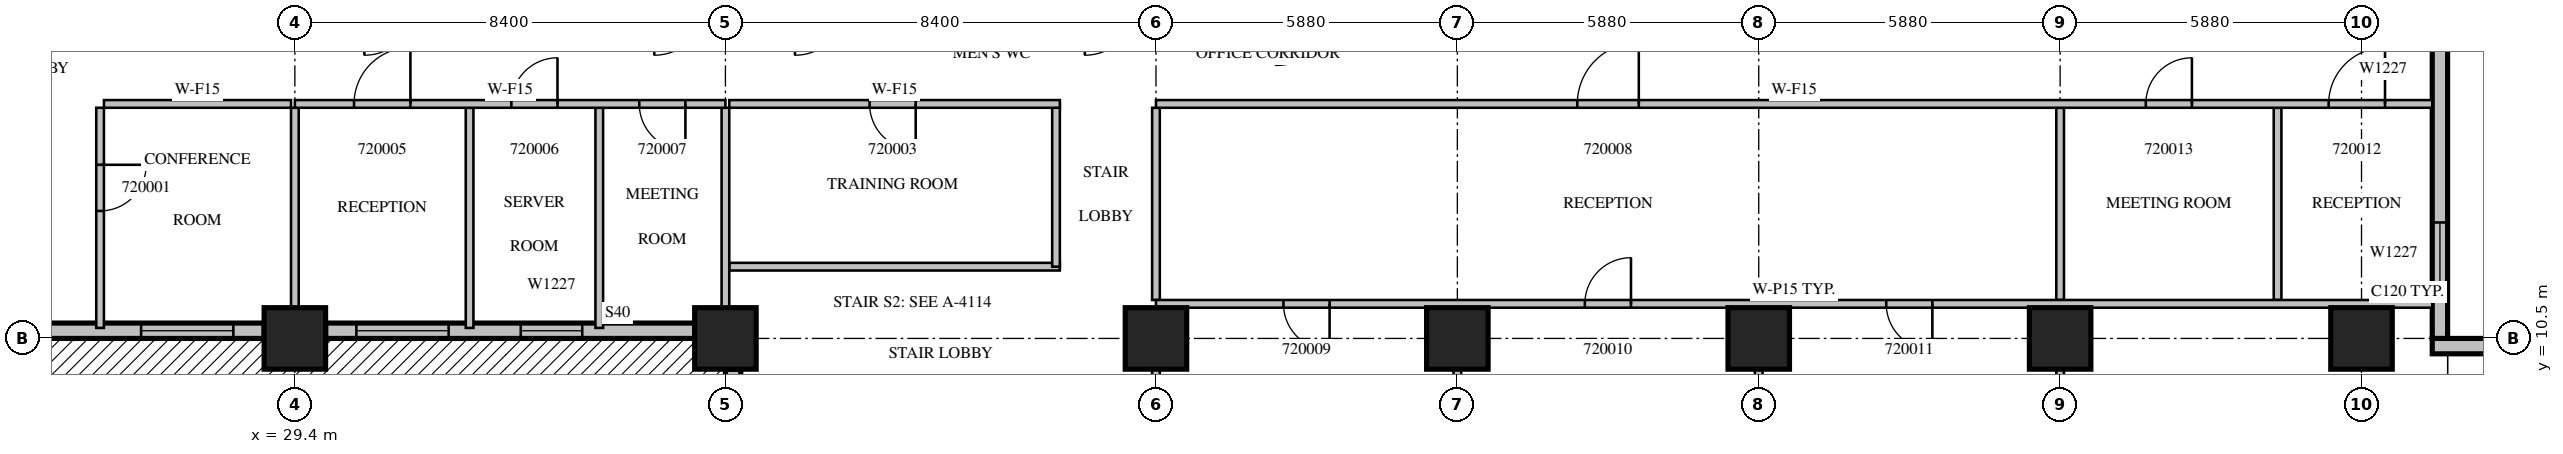
"""IFC4 building model, lengths in metres.
Left out: names, types, materials, properties, quantities, classifications, styles, units other than length and angle.
Written with IfcOpenShell. Run it as: python <this file> out.ifc"""

import sys

from ifc_helpers import new_model, si_unit, direction, frame, frame_2d, origin, origin_2d, place, context, subcontext, project, spatial, rectangle, extrude, source, transform, mapped, element, fill, save


model = new_model("IFC4")
c1 = context("Model", 3, precision=1e-05, world=origin(), true_north=direction((0.0, 1.0)))
c2 = subcontext(c1, "Body", "Model", "MODEL_VIEW")
j1 = project(units=[si_unit("LENGTHUNIT", "METRE"), si_unit("PLANEANGLEUNIT", "RADIAN")], contexts=[c1])
p1 = place(None, origin())
s1 = spatial("IfcSite", under=j1, at=p1, CompositionType="ELEMENT")
p2 = place(p1, origin())
s2 = spatial("IfcBuilding", under=s1, at=p2, CompositionType="ELEMENT")
p3 = place(p2, frame((0.0, 0.0, 95.1)))
s3 = spatial("IfcBuildingStorey", under=s2, at=p3, CompositionType="ELEMENT", Elevation=95.1)
m1 = source(origin(), c2, "Body", "SweptSolid", [
    extrude(rectangle(XDim=1.2, YDim=1.2, at=origin_2d()), origin(), (0.0, 0.0, 1.0), 4.2),
])
for number, where, z_axis, x_axis in (
    (1, (29.4, 10.5, 0.0), (0.0, 0.0, 1.0), (1.0, 0.0, 0.0)),
    (2, (37.8, 10.5, 0.0), (0.0, 0.0, 1.0), (1.0, 0.0, 0.0)),
    (3, (46.2, 10.5, 0.0), (0.0, 0.0, 1.0), (1.0, 0.0, 0.0)),
    (4, (52.08, 10.5, 0.0), (0.0, 0.0, 1.0), (1.0, 0.0, 0.0)),
    (5, (57.96, 10.5, 0.0), (0.0, 0.0, 1.0), (1.0, 0.0, 0.0)),
    (6, (63.84, 10.5, 0.0), (0.0, 0.0, 1.0), (1.0, 0.0, 0.0)),
    (7, (69.72, 10.5, 0.0), (0.0, 0.0, 1.0), (1.0, 0.0, 0.0)),
):
    element("IfcColumn", number, at=place(p3, frame(where, z_axis=z_axis, x_axis=x_axis)), inside=s3, PredefinedType="COLUMN", context=c2, shape_type="MappedRepresentation", body=[
        mapped(m1, transform((0.0, 0.0, 0.0), scale=1.0)),
    ])
m2 = source(origin(), c2, "Body", "SweptSolid", [
    extrude(rectangle(XDim=6.6, YDim=0.3, at=frame_2d((3.3, 0.0))), origin(), (0.0, 0.0, 1.0), 3.8),
])
p4 = place(p3, frame((22.2, 10.65, 0.0), z_axis=(0.0, 0.0, 1.0), x_axis=(1.0, 0.0, 0.0)))
e8 = element("IfcWall", 8, at=p4, inside=s3, PredefinedType="STANDARD", context=c2, shape_type="MappedRepresentation", body=[
    mapped(m2, transform((0.0, 0.0, 0.0), scale=1.0)),
])
m3 = source(origin(), c2, "Body", "SweptSolid", [
    extrude(rectangle(XDim=1.8, YDim=2.4, at=frame_2d((0.9, 1.2))), frame((0.0, 0.16, 0.0), z_axis=(0.0, -1.0, 0.0), x_axis=(1.0, 0.0, 0.0)), (0.0, 0.0, 1.0), 0.32),
])
p5 = place(p4, frame((0.1, 0.0, 0.0)))
e9 = element("IfcOpeningElement", 9, at=p5, cuts=e8, PredefinedType="OPENING", context=c2, shape_type="MappedRepresentation", body=[
    mapped(m3, transform((0.0, 0.0, 0.0), scale=1.0)),
])
p6 = place(p4, frame((4.2, 0.0, 0.0)))
e10 = element("IfcOpeningElement", 10, at=p6, cuts=e8, PredefinedType="OPENING", context=c2, shape_type="MappedRepresentation", body=[
    mapped(m3, transform((0.0, 0.0, 0.0), scale=1.0)),
])
m4 = source(origin(), c2, "Body", "SweptSolid", [
    extrude(rectangle(XDim=7.2, YDim=0.3, at=frame_2d((3.6, 0.0))), origin(), (0.0, 0.0, 1.0), 3.8),
])
p7 = place(p3, frame((30.0, 10.65, 0.0), z_axis=(0.0, 0.0, 1.0), x_axis=(1.0, 0.0, 0.0)))
e11 = element("IfcWall", 11, at=p7, inside=s3, PredefinedType="STANDARD", context=c2, shape_type="MappedRepresentation", body=[
    mapped(m4, transform((0.0, 0.0, 0.0), scale=1.0)),
])
p8 = place(p7, frame((0.6, 0.0, 0.0)))
e12 = element("IfcOpeningElement", 12, at=p8, cuts=e11, PredefinedType="OPENING", context=c2, shape_type="MappedRepresentation", body=[
    mapped(m3, transform((0.0, 0.0, 0.0), scale=1.0)),
])
m5 = source(origin(), c2, "Body", "SweptSolid", [
    extrude(rectangle(XDim=1.2, YDim=2.7, at=frame_2d((0.6, 1.35))), frame((0.0, 0.16, 0.0), z_axis=(0.0, -1.0, 0.0), x_axis=(1.0, 0.0, 0.0)), (0.0, 0.0, 1.0), 0.32),
])
p9 = place(p7, frame((3.807, 0.0, 0.6)))
e13 = element("IfcOpeningElement", 13, at=p9, cuts=e11, PredefinedType="OPENING", context=c2, shape_type="MappedRepresentation", body=[
    mapped(m5, transform((0.0, 0.0, 0.0), scale=1.0)),
])
m6 = source(origin(), c2, "Body", "SweptSolid", [
    extrude(rectangle(XDim=8.7, YDim=0.3, at=frame_2d((4.35, 0.0))), origin(), (0.0, 0.0, 1.0), 3.8),
])
p10 = place(p3, frame((37.95, 9.9, 0.0), z_axis=(0.0, 0.0, 1.0), x_axis=(0.0, -1.0, 0.0)))
e14 = element("IfcWall", 14, at=p10, inside=s3, PredefinedType="STANDARD", context=c2, shape_type="MappedRepresentation", body=[
    mapped(m6, transform((0.0, 0.0, 0.0), scale=1.0)),
])
m7 = source(origin(), c2, "Body", "SweptSolid", [
    extrude(rectangle(XDim=1.8, YDim=2.7, at=frame_2d((0.9, 1.35))), frame((0.0, 0.16, 0.0), z_axis=(0.0, -1.0, 0.0), x_axis=(1.0, 0.0, 0.0)), (0.0, 0.0, 1.0), 0.32),
])
p11 = place(p10, frame((1.812, 0.0, 0.6)))
e15 = element("IfcOpeningElement", 15, at=p11, cuts=e14, PredefinedType="OPENING", context=c2, shape_type="MappedRepresentation", body=[
    mapped(m7, transform((0.0, 0.0, 0.0), scale=1.0)),
])
m8 = source(origin(), c2, "Body", "SweptSolid", [
    extrude(rectangle(XDim=2.4, YDim=2.7, at=frame_2d((1.2, 1.35))), frame((0.0, 0.16, 0.0), z_axis=(0.0, -1.0, 0.0), x_axis=(1.0, 0.0, 0.0)), (0.0, 0.0, 1.0), 0.32),
])
p12 = place(p10, frame((6.075, 0.0, 0.6)))
e16 = element("IfcOpeningElement", 16, at=p12, cuts=e14, PredefinedType="OPENING", context=c2, shape_type="MappedRepresentation", body=[
    mapped(m8, transform((0.0, 0.0, 0.0), scale=1.0)),
])
m9 = source(origin(), c2, "Body", "SweptSolid", [
    extrude(rectangle(XDim=1.2, YDim=0.3, at=frame_2d((0.6, 0.0))), origin(), (0.0, 0.0, 1.0), 3.8),
])
p13 = place(p3, frame((71.1, 10.35, 0.0), z_axis=(0.0, 0.0, 1.0), x_axis=(1.0, 0.0, 0.0)))
e17 = element("IfcWall", 17, at=p13, inside=s3, PredefinedType="STANDARD", context=c2, shape_type="MappedRepresentation", body=[
    mapped(m9, transform((0.0, 0.0, 0.0), scale=1.0)),
])
m10 = source(origin(), c2, "Body", "SweptSolid", [
    extrude(rectangle(XDim=6.3, YDim=0.3, at=frame_2d((3.15, 0.0))), origin(), (0.0, 0.0, 1.0), 3.8),
])
p14 = place(p3, frame((71.25, 10.5, 0.0), z_axis=(0.0, 0.0, 1.0), x_axis=(0.0, 1.0, 0.0)))
e18 = element("IfcWall", 18, at=p14, inside=s3, PredefinedType="STANDARD", context=c2, shape_type="MappedRepresentation", body=[
    mapped(m10, transform((0.0, 0.0, 0.0), scale=1.0)),
])
p15 = place(p14, frame((1.062, 0.0, 0.6)))
e19 = element("IfcOpeningElement", 19, at=p15, cuts=e18, PredefinedType="OPENING", context=c2, shape_type="MappedRepresentation", body=[
    mapped(m5, transform((0.0, 0.0, 0.0), scale=1.0)),
])
m11 = source(origin(), c2, "Body", "SweptSolid", [
    extrude(rectangle(XDim=4.295, YDim=0.15, at=frame_2d((2.147, 0.0))), origin(), (0.0, 0.0, 1.0), 3.8),
])
p16 = place(p3, frame((25.6, 15.0, 0.0), z_axis=(0.0, 0.0, 1.0), x_axis=(0.0, -1.0, 0.0)))
e20 = element("IfcWall", 20, at=p16, inside=s3, PredefinedType="PARTITIONING", context=c2, shape_type="MappedRepresentation", body=[
    mapped(m11, transform((0.0, 0.0, 0.0), scale=1.0)),
])
m12 = source(origin(), c2, "Body", "SweptSolid", [
    extrude(rectangle(XDim=0.9, YDim=2.1, at=frame_2d((0.45, 1.05))), frame((0.0, 0.085, 0.0), z_axis=(0.0, -1.0, 0.0), x_axis=(1.0, 0.0, 0.0)), (0.0, 0.0, 1.0), 0.17),
])
p17 = place(p16, frame((1.113, 0.0, 0.0)))
e21 = element("IfcOpeningElement", 21, at=p17, cuts=e20, PredefinedType="OPENING", context=c2, shape_type="MappedRepresentation", body=[
    mapped(m12, transform((0.0, 0.0, 0.0), scale=1.0)),
])
m13 = source(origin(), c2, "Body", "SweptSolid", [
    extrude(rectangle(XDim=3.65, YDim=0.15, at=frame_2d((1.825, 0.0))), origin(), (0.0, 0.0, 1.0), 3.8),
])
p18 = place(p3, frame((29.325, 15.075, 0.0), z_axis=(0.0, 0.0, 1.0), x_axis=(-1.0, 0.0, 0.0)))
e22 = element("IfcWall", 22, at=p18, inside=s3, PredefinedType="PARTITIONING", context=c2, shape_type="MappedRepresentation", body=[
    mapped(m13, transform((0.0, 0.0, 0.0), scale=1.0)),
])
m14 = source(origin(), c2, "Body", "SweptSolid", [
    extrude(rectangle(XDim=3.901, YDim=0.15, at=frame_2d((1.95, 0.0))), origin(), (0.0, 0.0, 1.0), 3.8),
])
p19 = place(p3, frame((29.4, 11.099, 0.0), z_axis=(0.0, 0.0, 1.0), x_axis=(0.0, 1.0, 0.0)))
e23 = element("IfcWall", 23, at=p19, inside=s3, PredefinedType="PARTITIONING", context=c2, shape_type="MappedRepresentation", body=[
    mapped(m14, transform((0.0, 0.0, 0.0), scale=1.0)),
])
m15 = source(origin(), c2, "Body", "SweptSolid", [
    extrude(rectangle(XDim=6.45, YDim=0.15, at=frame_2d((3.225, 0.0))), origin(), (0.0, 0.0, 1.0), 3.8),
])
p20 = place(p3, frame((37.875, 11.9, 0.0), z_axis=(0.0, 0.0, 1.0), x_axis=(1.0, 0.0, 0.0)))
e24 = element("IfcWall", 24, at=p20, inside=s3, PredefinedType="PARTITIONING", context=c2, shape_type="MappedRepresentation", body=[
    mapped(m15, transform((0.0, 0.0, 0.0), scale=1.0)),
])
m16 = source(origin(), c2, "Body", "SweptSolid", [
    extrude(rectangle(XDim=3.175, YDim=0.15, at=frame_2d((1.587, 0.0))), origin(), (0.0, 0.0, 1.0), 3.8),
])
p21 = place(p3, frame((44.25, 11.9, 0.0), z_axis=(0.0, 0.0, 1.0), x_axis=(0.0, 1.0, 0.0)))
e25 = element("IfcWall", 25, at=p21, inside=s3, PredefinedType="PARTITIONING", context=c2, shape_type="MappedRepresentation", body=[
    mapped(m16, transform((0.0, 0.0, 0.0), scale=1.0)),
])
p22 = place(p3, frame((44.325, 15.075, 0.0), z_axis=(0.0, 0.0, 1.0), x_axis=(-1.0, 0.0, 0.0)))
e26 = element("IfcWall", 26, at=p22, inside=s3, PredefinedType="PARTITIONING", context=c2, shape_type="MappedRepresentation", body=[
    mapped(m15, transform((0.0, 0.0, 0.0), scale=1.0)),
])
p23 = place(p22, frame((2.812, 0.0, 0.0)))
e27 = element("IfcOpeningElement", 27, at=p23, cuts=e26, PredefinedType="OPENING", context=c2, shape_type="MappedRepresentation", body=[
    mapped(m12, transform((0.0, 0.0, 0.0), scale=1.0)),
])
for number, where, z_axis, x_axis in (
    (28, (32.809, 10.705, 0.0), (0.0, 0.0, 1.0), (0.0, 1.0, 0.0)),
    (29, (35.339, 10.705, 0.0), (0.0, 0.0, 1.0), (0.0, 1.0, 0.0)),
):
    element("IfcWall", number, at=place(p3, frame(where, z_axis=z_axis, x_axis=x_axis)), inside=s3, PredefinedType="PARTITIONING", context=c2, shape_type="MappedRepresentation", body=[
        mapped(m11, transform((0.0, 0.0, 0.0), scale=1.0)),
    ])
p24 = place(p3, frame((37.8, 11.099, 0.0), z_axis=(0.0, 0.0, 1.0), x_axis=(0.0, 1.0, 0.0)))
e30 = element("IfcWall", 30, at=p24, inside=s3, PredefinedType="PARTITIONING", context=c2, shape_type="MappedRepresentation", body=[
    mapped(m14, transform((0.0, 0.0, 0.0), scale=1.0)),
])
m17 = source(origin(), c2, "Body", "SweptSolid", [
    extrude(rectangle(XDim=8.702, YDim=0.15, at=frame_2d((4.351, 0.0))), origin(), (0.0, 0.0, 1.0), 3.8),
])
for number, where, z_axis, x_axis in (
    (31, (52.08, 1.199, 0.0), (0.0, 0.0, 1.0), (0.0, 1.0, 0.0)),
    (32, (57.96, 1.199, 0.0), (0.0, 0.0, 1.0), (0.0, 1.0, 0.0)),
):
    element("IfcWall", number, at=place(p3, frame(where, z_axis=z_axis, x_axis=x_axis)), inside=s3, PredefinedType="PARTITIONING", context=c2, shape_type="MappedRepresentation", body=[
        mapped(m17, transform((0.0, 0.0, 0.0), scale=1.0)),
    ])
m18 = source(origin(), c2, "Body", "SweptSolid", [
    extrude(rectangle(XDim=3.75, YDim=0.15, at=frame_2d((1.875, 0.0))), origin(), (0.0, 0.0, 1.0), 3.8),
])
p25 = place(p3, frame((68.082, 11.25, 0.0), z_axis=(0.0, 0.0, 1.0), x_axis=(0.0, 1.0, 0.0)))
e33 = element("IfcWall", 33, at=p25, inside=s3, PredefinedType="PARTITIONING", context=c2, shape_type="MappedRepresentation", body=[
    mapped(m18, transform((0.0, 0.0, 0.0), scale=1.0)),
])
p26 = place(p3, frame((46.2, 1.199, 0.0), z_axis=(0.0, 0.0, 1.0), x_axis=(0.0, 1.0, 0.0)))
e34 = element("IfcWall", 34, at=p26, inside=s3, PredefinedType="PARTITIONING", context=c2, shape_type="MappedRepresentation", body=[
    mapped(m17, transform((0.0, 0.0, 0.0), scale=1.0)),
])
p27 = place(p3, frame((46.2, 11.25, 0.0), z_axis=(0.0, 0.0, 1.0), x_axis=(0.0, 1.0, 0.0)))
e35 = element("IfcWall", 35, at=p27, inside=s3, PredefinedType="PARTITIONING", context=c2, shape_type="MappedRepresentation", body=[
    mapped(m18, transform((0.0, 0.0, 0.0), scale=1.0)),
])
p28 = place(p3, frame((63.84, 1.199, 0.0), z_axis=(0.0, 0.0, 1.0), x_axis=(0.0, 1.0, 0.0)))
e36 = element("IfcWall", 36, at=p28, inside=s3, PredefinedType="PARTITIONING", context=c2, shape_type="MappedRepresentation", body=[
    mapped(m17, transform((0.0, 0.0, 0.0), scale=1.0)),
])
p29 = place(p28, frame((3.901, 0.0, 0.0)))
e37 = element("IfcOpeningElement", 37, at=p29, cuts=e36, PredefinedType="OPENING", context=c2, shape_type="MappedRepresentation", body=[
    mapped(m12, transform((0.0, 0.0, 0.0), scale=1.0)),
])
p30 = place(p3, frame((63.84, 11.25, 0.0), z_axis=(0.0, 0.0, 1.0), x_axis=(0.0, 1.0, 0.0)))
e38 = element("IfcWall", 38, at=p30, inside=s3, PredefinedType="PARTITIONING", context=c2, shape_type="MappedRepresentation", body=[
    mapped(m18, transform((0.0, 0.0, 0.0), scale=1.0)),
])
m19 = source(origin(), c2, "Body", "SweptSolid", [
    extrude(rectangle(XDim=24.9, YDim=0.15, at=frame_2d((12.45, 0.0))), origin(), (0.0, 0.0, 1.0), 3.8),
])
p31 = place(p3, frame((71.1, 11.175, 0.0), z_axis=(0.0, 0.0, 1.0), x_axis=(-1.0, 0.0, 0.0)))
e39 = element("IfcWall", 39, at=p31, inside=s3, PredefinedType="PARTITIONING", context=c2, shape_type="MappedRepresentation", body=[
    mapped(m19, transform((0.0, 0.0, 0.0), scale=1.0)),
])
p32 = place(p31, frame((21.512, 0.0, 0.0)))
e40 = element("IfcOpeningElement", 40, at=p32, cuts=e39, PredefinedType="OPENING", context=c2, shape_type="MappedRepresentation", body=[
    mapped(m12, transform((0.0, 0.0, 0.0), scale=1.0)),
])
p33 = place(p31, frame((15.633, 0.0, 0.0)))
e41 = element("IfcOpeningElement", 41, at=p33, cuts=e39, PredefinedType="OPENING", context=c2, shape_type="MappedRepresentation", body=[
    mapped(m12, transform((0.0, 0.0, 0.0), scale=1.0)),
])
p34 = place(p31, frame((9.752, 0.0, 0.0)))
e42 = element("IfcOpeningElement", 42, at=p34, cuts=e39, PredefinedType="OPENING", context=c2, shape_type="MappedRepresentation", body=[
    mapped(m12, transform((0.0, 0.0, 0.0), scale=1.0)),
])
m20 = source(origin(), c2, "Body", "SweptSolid", [
    extrude(rectangle(XDim=8.4, YDim=0.15, at=frame_2d((4.2, 0.0))), origin(), (0.0, 0.0, 1.0), 3.8),
])
p35 = place(p3, frame((37.8, 15.075, 0.0), z_axis=(0.0, 0.0, 1.0), x_axis=(-1.0, 0.0, 0.0)))
e43 = element("IfcWall", 43, at=p35, inside=s3, PredefinedType="PARTITIONING", context=c2, shape_type="MappedRepresentation", body=[
    mapped(m20, transform((0.0, 0.0, 0.0), scale=1.0)),
])
m21 = source(origin(), c2, "Body", "SweptSolid", [
    extrude(rectangle(XDim=1.1, YDim=2.1, at=frame_2d((0.55, 1.05))), frame((0.0, 0.085, 0.0), z_axis=(0.0, -1.0, 0.0), x_axis=(1.0, 0.0, 0.0)), (0.0, 0.0, 1.0), 0.17),
])
p36 = place(p35, frame((6.146, 0.0, 0.0)))
e44 = element("IfcOpeningElement", 44, at=p36, cuts=e43, PredefinedType="OPENING", context=c2, shape_type="MappedRepresentation", body=[
    mapped(m21, transform((0.0, 0.0, 0.0), scale=1.0)),
])
p37 = place(p35, frame((3.276, 0.0, 0.0)))
e45 = element("IfcOpeningElement", 45, at=p37, cuts=e43, PredefinedType="OPENING", context=c2, shape_type="MappedRepresentation", body=[
    mapped(m12, transform((0.0, 0.0, 0.0), scale=1.0)),
])
p38 = place(p35, frame((0.781, 0.0, 0.0)))
e46 = element("IfcOpeningElement", 46, at=p38, cuts=e43, PredefinedType="OPENING", context=c2, shape_type="MappedRepresentation", body=[
    mapped(m12, transform((0.0, 0.0, 0.0), scale=1.0)),
])
p39 = place(p3, frame((71.1, 15.075, 0.0), z_axis=(0.0, 0.0, 1.0), x_axis=(-1.0, 0.0, 0.0)))
e47 = element("IfcWall", 47, at=p39, inside=s3, PredefinedType="PARTITIONING", context=c2, shape_type="MappedRepresentation", body=[
    mapped(m19, transform((0.0, 0.0, 0.0), scale=1.0)),
])
m22 = source(origin(), c2, "Body", "SweptSolid", [
    extrude(rectangle(XDim=1.2, YDim=2.1, at=frame_2d((0.6, 1.05))), frame((0.0, 0.085, 0.0), z_axis=(0.0, -1.0, 0.0), x_axis=(1.0, 0.0, 0.0)), (0.0, 0.0, 1.0), 0.17),
])
p40 = place(p39, frame((15.48, 0.0, 0.0)))
e48 = element("IfcOpeningElement", 48, at=p40, cuts=e47, PredefinedType="OPENING", context=c2, shape_type="MappedRepresentation", body=[
    mapped(m22, transform((0.0, 0.0, 0.0), scale=1.0)),
])
p41 = place(p39, frame((0.921, 0.0, 0.0)))
e49 = element("IfcOpeningElement", 49, at=p41, cuts=e47, PredefinedType="OPENING", context=c2, shape_type="MappedRepresentation", body=[
    mapped(m21, transform((0.0, 0.0, 0.0), scale=1.0)),
])
p42 = place(p39, frame((4.689, 0.0, 0.0)))
e50 = element("IfcOpeningElement", 50, at=p42, cuts=e47, PredefinedType="OPENING", context=c2, shape_type="MappedRepresentation", body=[
    mapped(m12, transform((0.0, 0.0, 0.0), scale=1.0)),
])
m23 = source(origin(), c2, "Body", "SweptSolid", [
    extrude(rectangle(XDim=1.8, YDim=2.4, at=frame_2d((0.9, 1.2))), frame((0.0, 0.025, 0.0), z_axis=(0.0, -1.0, 0.0), x_axis=(1.0, 0.0, 0.0)), (0.0, 0.0, 1.0), 0.05),
])
p43 = place(p6, origin())
e51 = element("IfcDoor", 51, at=p43, inside=s3, OperationType="SLIDING_TO_LEFT", PredefinedType="DOOR", context=c2, shape_type="MappedRepresentation", body=[
    mapped(m23, transform((0.0, 0.0, 0.0), scale=1.0)),
])
fill(e10, e51)
p44 = place(p8, origin())
e52 = element("IfcDoor", 52, at=p44, inside=s3, OperationType="SLIDING_TO_LEFT", PredefinedType="DOOR", context=c2, shape_type="MappedRepresentation", body=[
    mapped(m23, transform((0.0, 0.0, 0.0), scale=1.0)),
])
fill(e12, e52)
m24 = source(origin(), c2, "Body", "SweptSolid", [
    extrude(rectangle(XDim=1.2, YDim=2.7, at=frame_2d((0.6, 1.35))), frame((0.0, 0.03, 0.0), z_axis=(0.0, -1.0, 0.0), x_axis=(1.0, 0.0, 0.0)), (0.0, 0.0, 1.0), 0.06),
])
p45 = place(p9, origin())
e53 = element("IfcWindow", 53, at=p45, inside=s3, PartitioningType="SINGLE_PANEL", PredefinedType="WINDOW", context=c2, shape_type="MappedRepresentation", body=[
    mapped(m24, transform((0.0, 0.0, 0.0), scale=1.0)),
])
fill(e13, e53)
p46 = place(p15, origin())
e54 = element("IfcWindow", 54, at=p46, inside=s3, PartitioningType="SINGLE_PANEL", PredefinedType="WINDOW", context=c2, shape_type="MappedRepresentation", body=[
    mapped(m24, transform((0.0, 0.0, 0.0), scale=1.0)),
])
fill(e19, e54)
m25 = source(origin(), c2, "Body", "SweptSolid", [
    extrude(rectangle(XDim=0.9, YDim=2.1, at=frame_2d((0.45, 1.05))), frame((0.0, 0.025, 0.0), z_axis=(0.0, -1.0, 0.0), x_axis=(1.0, 0.0, 0.0)), (0.0, 0.0, 1.0), 0.05),
])
p47 = place(p17, origin())
e55 = element("IfcDoor", 55, at=p47, inside=s3, OperationType="SINGLE_SWING_LEFT", PredefinedType="DOOR", context=c2, shape_type="MappedRepresentation", body=[
    mapped(m25, transform((0.0, 0.0, 0.0), scale=1.0)),
])
fill(e21, e55)
p48 = place(p23, origin())
e56 = element("IfcDoor", 56, at=p48, inside=s3, OperationType="SINGLE_SWING_LEFT", PredefinedType="DOOR", context=c2, shape_type="MappedRepresentation", body=[
    mapped(m25, transform((0.0, 0.0, 0.0), scale=1.0)),
])
fill(e27, e56)
m26 = source(origin(), c2, "Body", "SweptSolid", [
    extrude(rectangle(XDim=1.1, YDim=2.1, at=frame_2d((0.55, 1.05))), frame((0.0, 0.025, 0.0), z_axis=(0.0, -1.0, 0.0), x_axis=(1.0, 0.0, 0.0)), (0.0, 0.0, 1.0), 0.05),
])
p49 = place(p36, origin())
e57 = element("IfcDoor", 57, at=p49, inside=s3, OperationType="SINGLE_SWING_RIGHT", PredefinedType="DOOR", context=c2, shape_type="MappedRepresentation", body=[
    mapped(m26, transform((0.0, 0.0, 0.0), scale=1.0)),
])
fill(e44, e57)
p50 = place(p37, origin())
e58 = element("IfcDoor", 58, at=p50, inside=s3, OperationType="SINGLE_SWING_RIGHT", PredefinedType="DOOR", context=c2, shape_type="MappedRepresentation", body=[
    mapped(m25, transform((0.0, 0.0, 0.0), scale=1.0)),
])
fill(e45, e58)
p51 = place(p38, origin())
e59 = element("IfcDoor", 59, at=p51, inside=s3, OperationType="SINGLE_SWING_LEFT", PredefinedType="DOOR", context=c2, shape_type="MappedRepresentation", body=[
    mapped(m25, transform((0.0, 0.0, 0.0), scale=1.0)),
])
fill(e46, e59)
m27 = source(origin(), c2, "Body", "SweptSolid", [
    extrude(rectangle(XDim=1.2, YDim=2.1, at=frame_2d((0.6, 1.05))), frame((0.0, 0.025, 0.0), z_axis=(0.0, -1.0, 0.0), x_axis=(1.0, 0.0, 0.0)), (0.0, 0.0, 1.0), 0.05),
])
p52 = place(p40, origin())
e60 = element("IfcDoor", 60, at=p52, inside=s3, OperationType="SINGLE_SWING_RIGHT", PredefinedType="DOOR", context=c2, shape_type="MappedRepresentation", body=[
    mapped(m27, transform((0.0, 0.0, 0.0), scale=1.0)),
])
fill(e48, e60)
p53 = place(p32, origin())
e61 = element("IfcDoor", 61, at=p53, inside=s3, OperationType="SINGLE_SWING_LEFT", PredefinedType="DOOR", context=c2, shape_type="MappedRepresentation", body=[
    mapped(m25, transform((0.0, 0.0, 0.0), scale=1.0)),
])
fill(e40, e61)
p54 = place(p33, origin())
e62 = element("IfcDoor", 62, at=p54, inside=s3, OperationType="SINGLE_SWING_RIGHT", PredefinedType="DOOR", context=c2, shape_type="MappedRepresentation", body=[
    mapped(m25, transform((0.0, 0.0, 0.0), scale=1.0)),
])
fill(e41, e62)
p55 = place(p34, origin())
e63 = element("IfcDoor", 63, at=p55, inside=s3, OperationType="SINGLE_SWING_LEFT", PredefinedType="DOOR", context=c2, shape_type="MappedRepresentation", body=[
    mapped(m25, transform((0.0, 0.0, 0.0), scale=1.0)),
])
fill(e42, e63)
p56 = place(p41, origin())
e64 = element("IfcDoor", 64, at=p56, inside=s3, OperationType="SINGLE_SWING_RIGHT", PredefinedType="DOOR", context=c2, shape_type="MappedRepresentation", body=[
    mapped(m26, transform((0.0, 0.0, 0.0), scale=1.0)),
])
fill(e49, e64)
p57 = place(p42, origin())
e65 = element("IfcDoor", 65, at=p57, inside=s3, OperationType="SINGLE_SWING_RIGHT", PredefinedType="DOOR", context=c2, shape_type="MappedRepresentation", body=[
    mapped(m25, transform((0.0, 0.0, 0.0), scale=1.0)),
])
fill(e50, e65)
save(model, sys.argv[1])
